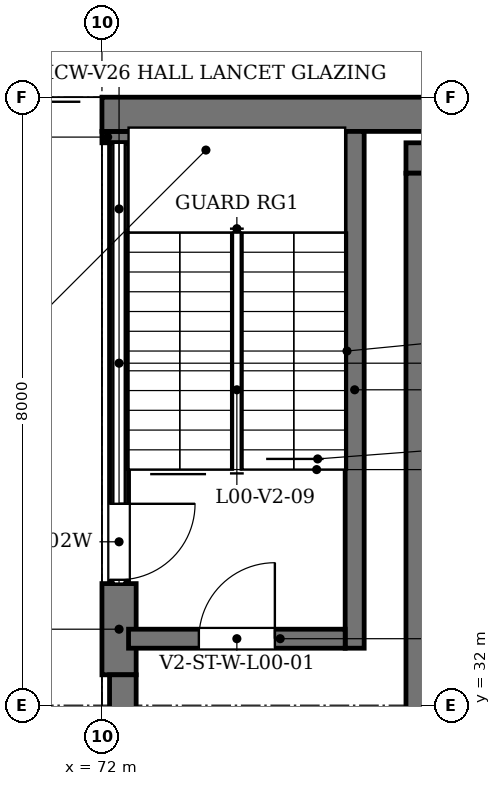
"""IFC4 building model, lengths in metres.
Left out: names, types, materials, properties, quantities, classifications, styles, units other than length and angle.
Written with IfcOpenShell. Run it as: python <this file> out.ifc"""

import sys

from ifc_helpers import new_model, si_unit, direction, frame, frame_2d, origin, place, context, subcontext, project, spatial, rectangle, extrude, element, fill, save


model = new_model("IFC4")
c1 = context("Model", 3, precision=1e-05, world=origin(), true_north=direction((0.0, 1.0)))
c2 = subcontext(c1, "Body", "Model", "MODEL_VIEW")
j1 = project(units=[si_unit("LENGTHUNIT", "METRE"), si_unit("PLANEANGLEUNIT", "RADIAN")], contexts=[c1])
p1 = place(None, origin())
s1 = spatial("IfcSite", under=j1, at=p1, CompositionType="ELEMENT")
p2 = place(p1, origin())
s2 = spatial("IfcBuilding", under=s1, at=p2, CompositionType="ELEMENT")
p3 = place(p2, origin())
s3 = spatial("IfcBuildingStorey", under=s2, at=p3, CompositionType="ELEMENT", Elevation=0.0)
p4 = place(p3, frame((76.0, 39.2, 0.0), z_axis=(0.0, 0.0, 1.0), x_axis=(1.0, 0.0, 0.0)))
e1 = element("IfcWall", 1, at=p4, inside=s3, PredefinedType="SHEAR", context=c2, shape_type="SweptSolid", body=[
    extrude(rectangle(XDim=24.0, YDim=0.4, at=frame_2d((12.0, 0.0))), origin(), (0.0, 0.0, 1.0), 4.55),
])
p5 = place(p3, frame((76.2, 16.4, 0.0), z_axis=(0.0, 0.0, 1.0), x_axis=(0.0, 1.0, 0.0)))
e2 = element("IfcWall", 2, at=p5, inside=s3, PredefinedType="SHEAR", context=c2, shape_type="SweptSolid", body=[
    extrude(rectangle(XDim=22.6, YDim=0.4, at=frame_2d((11.3, 0.0))), origin(), (0.0, 0.0, 1.0), 4.55),
])
p6 = place(p3, frame((72.225, 32.4, 0.0), z_axis=(0.0, 0.0, 1.0), x_axis=(0.0, 1.0, 0.0)))
e3 = element("IfcWall", 3, at=p6, inside=s3, PredefinedType="SOLIDWALL", context=c2, shape_type="SweptSolid", body=[
    extrude(rectangle(XDim=1.2, YDim=0.45, at=frame_2d((0.6, 0.0))), origin(), (0.0, 0.0, 1.0), 4.8),
])
p7 = place(p3, frame((72.225, 39.4, 0.0), z_axis=(0.0, 0.0, 1.0), x_axis=(0.0, 1.0, 0.0)))
e4 = element("IfcWall", 4, at=p7, inside=s3, PredefinedType="SOLIDWALL", context=c2, shape_type="SweptSolid", body=[
    extrude(rectangle(XDim=0.15, YDim=0.45, at=frame_2d((0.075, 0.0))), origin(), (0.0, 0.0, 1.0), 4.8),
])
p8 = place(p3, frame((72.275, 26.6, 0.0), z_axis=(0.0, 0.0, 1.0), x_axis=(0.0, 1.0, 0.0)))
e5 = element("IfcWall", 5, at=p8, inside=s3, PredefinedType="SOLIDWALL", context=c2, shape_type="SweptSolid", body=[
    extrude(rectangle(XDim=5.8, YDim=0.35, at=frame_2d((2.9, 0.0))), origin(), (0.0, 0.0, 1.0), 4.8),
])
p9 = place(p8, frame((1.9, 0.0, 0.0)))
e6 = element("IfcOpeningElement", 6, at=p9, cuts=e5, PredefinedType="OPENING", context=c2, shape_type="SweptSolid", body=[
    extrude(rectangle(XDim=2.0, YDim=2.7, at=frame_2d((1.0, 1.35))), frame((0.0, 0.185, 0.0), z_axis=(0.0, -1.0, 0.0), x_axis=(1.0, 0.0, 0.0)), (0.0, 0.0, 1.0), 0.37),
])
p10 = place(p8, frame((1.9, 0.0, 3.0)))
e7 = element("IfcOpeningElement", 7, at=p10, cuts=e5, PredefinedType="OPENING", context=c2, shape_type="SweptSolid", body=[
    extrude(rectangle(XDim=2.0, YDim=1.5, at=frame_2d((1.0, 0.75))), frame((0.0, 0.185, 0.0), z_axis=(0.0, -1.0, 0.0), x_axis=(1.0, 0.0, 0.0)), (0.0, 0.0, 1.0), 0.37),
])
p11 = place(p3, frame((72.0, 39.775, 0.0), z_axis=(0.0, 0.0, 1.0), x_axis=(1.0, 0.0, 0.0)))
e8 = element("IfcWall", 8, at=p11, inside=s3, PredefinedType="SOLIDWALL", context=c2, shape_type="SweptSolid", body=[
    extrude(rectangle(XDim=32.0, YDim=0.45, at=frame_2d((16.0, 0.0))), origin(), (0.0, 0.0, 1.0), 4.8),
])
p12 = place(p3, frame((72.225, 33.6, 0.0), z_axis=(0.0, 0.0, 1.0), x_axis=(0.0, 1.0, 0.0)))
e9 = element("IfcWall", 9, at=p12, inside=s3, PredefinedType="SOLIDWALL", context=c2, shape_type="SweptSolid", body=[
    extrude(rectangle(XDim=5.8, YDim=0.25, at=frame_2d((2.9, 0.0))), origin(), (0.0, 0.0, 1.0), 4.53),
])
p13 = place(p12, frame((0.05, 0.0, 0.0)))
e10 = element("IfcOpeningElement", 10, at=p13, cuts=e9, PredefinedType="OPENING", context=c2, shape_type="SweptSolid", body=[
    extrude(rectangle(XDim=1.0, YDim=2.1, at=frame_2d((0.5, 1.05))), frame((0.0, 0.135, 0.0), z_axis=(0.0, -1.0, 0.0), x_axis=(1.0, 0.0, 0.0)), (0.0, 0.0, 1.0), 0.27),
])
p14 = place(p3, frame((75.325, 32.75, 0.0), z_axis=(0.0, 0.0, 1.0), x_axis=(0.0, 1.0, 0.0)))
e11 = element("IfcWall", 11, at=p14, inside=s3, PredefinedType="SOLIDWALL", context=c2, shape_type="SweptSolid", body=[
    extrude(rectangle(XDim=6.8, YDim=0.25, at=frame_2d((3.4, 0.0))), origin(), (0.0, 0.0, 1.0), 4.8),
])
p15 = place(p3, frame((72.35, 32.875, 0.0), z_axis=(0.0, 0.0, 1.0), x_axis=(1.0, 0.0, 0.0)))
e12 = element("IfcWall", 12, at=p15, inside=s3, PredefinedType="SOLIDWALL", context=c2, shape_type="SweptSolid", body=[
    extrude(rectangle(XDim=2.85, YDim=0.25, at=frame_2d((1.425, 0.0))), origin(), (0.0, 0.0, 1.0), 4.8),
])
p16 = place(p15, frame((0.925, 0.0, 0.0)))
e13 = element("IfcOpeningElement", 13, at=p16, cuts=e12, PredefinedType="OPENING", context=c2, shape_type="SweptSolid", body=[
    extrude(rectangle(XDim=1.0, YDim=2.1, at=frame_2d((0.5, 1.05))), frame((0.0, 0.135, 0.0), z_axis=(0.0, -1.0, 0.0), x_axis=(1.0, 0.0, 0.0)), (0.0, 0.0, 1.0), 0.27),
])
p17 = place(p16, frame((1.0, 0.0, 0.0), z_axis=(0.0, 0.0, 1.0), x_axis=(-1.0, 0.0, 0.0)))
e14 = element("IfcDoor", 14, at=p17, inside=s3, OperationType="SINGLE_SWING_RIGHT", PredefinedType="DOOR", context=c2, shape_type="SweptSolid", body=[
    extrude(rectangle(XDim=1.0, YDim=2.1, at=frame_2d((0.5, 1.05))), frame((0.0, 0.025, 0.0), z_axis=(0.0, -1.0, 0.0), x_axis=(1.0, 0.0, 0.0)), (0.0, 0.0, 1.0), 0.05),
])
fill(e13, e14)
p18 = place(p13, origin())
e15 = element("IfcDoor", 15, at=p18, inside=s3, OperationType="SINGLE_SWING_RIGHT", PredefinedType="DOOR", context=c2, shape_type="SweptSolid", body=[
    extrude(rectangle(XDim=1.0, YDim=2.1, at=frame_2d((0.5, 1.05))), frame((0.0, 0.025, 0.0), z_axis=(0.0, -1.0, 0.0), x_axis=(1.0, 0.0, 0.0)), (0.0, 0.0, 1.0), 0.05),
])
fill(e10, e15)
save(model, sys.argv[1])
